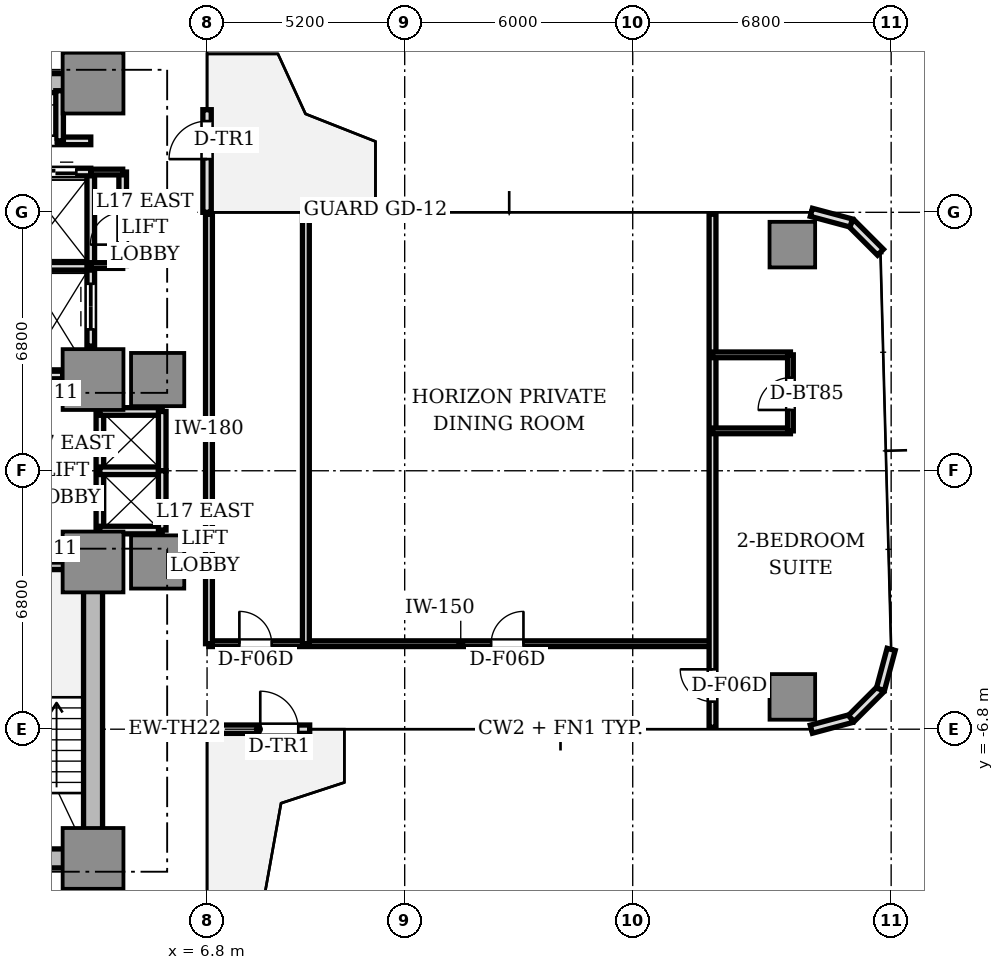
"""IFC4 building model, lengths in metres.
Left out: names, types, materials, properties, quantities, classifications, styles, units other than length and angle.
Written with IfcOpenShell. Run it as: python <this file> out.ifc"""

import sys

from ifc_helpers import new_model, si_unit, direction, frame, frame_2d, origin, origin_2d, place, context, subcontext, project, spatial, rectangle, extrude, source, transform, mapped, element, fill, save


model = new_model("IFC4")
c1 = context("Model", 3, precision=1e-05, world=origin(), true_north=direction((0.0, 1.0)))
c2 = subcontext(c1, "Body", "Model", "MODEL_VIEW")
j1 = project(units=[si_unit("LENGTHUNIT", "METRE"), si_unit("PLANEANGLEUNIT", "RADIAN")], contexts=[c1])
p1 = place(None, origin())
s1 = spatial("IfcSite", under=j1, at=p1, CompositionType="ELEMENT")
p2 = place(p1, origin())
s2 = spatial("IfcBuilding", under=s1, at=p2, CompositionType="ELEMENT")
p3 = place(p2, frame((0.0, 0.0, 64.45)))
s3 = spatial("IfcBuildingStorey", under=s2, at=p3, CompositionType="ELEMENT", Elevation=64.45)
for number, where, z_axis, x_axis in (
    (1, (-3.55, 10.2, 0.0), (0.0, 0.0, 1.0), (1.0, 0.0, 0.0)),
    (2, (-3.55, -10.2, 0.0), (0.0, 0.0, 1.0), (1.0, 0.0, 0.0)),
):
    element("IfcWall", number, at=place(p3, frame(where, z_axis=z_axis, x_axis=x_axis)), inside=s3, PredefinedType="SHEAR", context=c2, shape_type="SweptSolid", body=[
        extrude(rectangle(XDim=7.1, YDim=0.5, at=frame_2d((3.55, 0.0))), origin(), (0.0, 0.0, 1.0), 3.11),
    ])
p4 = place(p3, frame((3.8, -9.75, 0.0), z_axis=(0.0, 0.0, 1.0), x_axis=(0.0, 1.0, 0.0)))
e3 = element("IfcWall", 3, at=p4, inside=s3, PredefinedType="SHEAR", context=c2, shape_type="SweptSolid", body=[
    extrude(rectangle(XDim=6.9, YDim=0.5, at=frame_2d((3.45, 0.0))), origin(), (0.0, 0.0, 1.0), 3.11),
])
m1 = source(origin(), c2, "Body", "SweptSolid", [
    extrude(rectangle(XDim=1.6, YDim=1.6, at=origin_2d()), origin(), (0.0, 0.0, 1.0), 3.11),
])
for number, where, z_axis, x_axis in (
    (4, (3.8, 2.4, 0.0), (0.0, 0.0, 1.0), (1.0, 0.0, 0.0)),
    (5, (3.8, 10.2, 0.0), (0.0, 0.0, 1.0), (1.0, 0.0, 0.0)),
    (6, (3.8, -2.4, 0.0), (0.0, 0.0, 1.0), (1.0, 0.0, 0.0)),
    (7, (3.8, -10.2, 0.0), (0.0, 0.0, 1.0), (1.0, 0.0, 0.0)),
):
    element("IfcColumn", number, at=place(p3, frame(where, z_axis=z_axis, x_axis=x_axis)), inside=s3, PredefinedType="COLUMN", context=c2, shape_type="MappedRepresentation", body=[
        mapped(m1, transform((0.0, 0.0, 0.0), scale=1.0)),
    ])
m2 = source(origin(), c2, "Body", "SweptSolid", [
    extrude(rectangle(XDim=1.4, YDim=1.4, at=origin_2d()), origin(), (0.0, 0.0, 1.0), 3.11),
])
for number, where, z_axis, x_axis in (
    (8, (5.5, 2.4, 0.0), (0.0, 0.0, 1.0), (1.0, 0.0, 0.0)),
    (9, (5.5, -2.4, 0.0), (0.0, 0.0, 1.0), (1.0, 0.0, 0.0)),
):
    element("IfcColumn", number, at=place(p3, frame(where, z_axis=z_axis, x_axis=x_axis)), inside=s3, PredefinedType="COLUMN", context=c2, shape_type="MappedRepresentation", body=[
        mapped(m2, transform((0.0, 0.0, 0.0), scale=1.0)),
    ])
m3 = source(origin(), c2, "Body", "SweptSolid", [
    extrude(rectangle(XDim=1.2, YDim=1.2, at=origin_2d()), origin(), (0.0, 0.0, 1.0), 3.11),
])
for number, where, z_axis, x_axis in (
    (10, (22.2, -5.95, 0.0), (0.0, 0.0, 1.0), (1.0, 0.0, 0.0)),
    (11, (22.2, 5.95, 0.0), (0.0, 0.0, 1.0), (1.0, 0.0, 0.0)),
):
    element("IfcColumn", number, at=place(p3, frame(where, z_axis=z_axis, x_axis=x_axis)), inside=s3, PredefinedType="COLUMN", context=c2, shape_type="MappedRepresentation", body=[
        mapped(m3, transform((0.0, 0.0, 0.0), scale=1.0)),
    ])
p5 = place(p3, frame((6.8, -6.8, 0.0), z_axis=(0.0, 0.0, 1.0), x_axis=(1.0, 0.0, 0.0)))
e12 = element("IfcWall", 12, at=p5, inside=s3, PredefinedType="STANDARD", context=c2, shape_type="SweptSolid", body=[
    extrude(rectangle(XDim=2.7, YDim=0.22, at=frame_2d((1.35, 0.0))), origin(), (0.0, 0.0, 1.0), 3.11),
])
p6 = place(p5, frame((1.4, 0.0, 0.0)))
e13 = element("IfcOpeningElement", 13, at=p6, cuts=e12, PredefinedType="OPENING", context=c2, shape_type="SweptSolid", body=[
    extrude(rectangle(XDim=1.0, YDim=2.2, at=frame_2d((0.5, 1.1))), frame((0.0, 0.12, 0.0), z_axis=(0.0, -1.0, 0.0), x_axis=(1.0, 0.0, 0.0)), (0.0, 0.0, 1.0), 0.24),
])
for number, where, z_axis, x_axis in (
    (14, (22.7, -6.8, 0.0), (0.0, 0.0, 1.0), (0.966, 0.259, 0.0)),
    (15, (23.75, -6.519, 0.0), (0.0, 0.0, 1.0), (0.707, 0.707, 0.0)),
    (16, (24.519, -5.75, 0.0), (0.0, 0.0, 1.0), (0.259, 0.966, 0.0)),
    (17, (24.519, 5.75, 0.0), (0.0, 0.0, 1.0), (-0.707, 0.707, 0.0)),
    (18, (23.75, 6.519, 0.0), (0.0, 0.0, 1.0), (-0.966, 0.259, 0.0)),
):
    element("IfcWall", number, at=place(p3, frame(where, z_axis=z_axis, x_axis=x_axis)), inside=s3, PredefinedType="STANDARD", context=c2, shape_type="SweptSolid", body=[
        extrude(rectangle(XDim=1.087, YDim=0.22, at=frame_2d((0.543, 0.0))), origin(), (0.0, 0.0, 1.0), 3.11),
    ])
p7 = place(p3, frame((6.8, 6.8, 0.0), z_axis=(0.0, 0.0, 1.0), x_axis=(0.0, 1.0, 0.0)))
e19 = element("IfcWall", 19, at=p7, inside=s3, PredefinedType="STANDARD", context=c2, shape_type="SweptSolid", body=[
    extrude(rectangle(XDim=2.7, YDim=0.22, at=frame_2d((1.35, 0.0))), origin(), (0.0, 0.0, 1.0), 3.11),
])
p8 = place(p7, frame((1.4, 0.0, 0.0)))
e20 = element("IfcOpeningElement", 20, at=p8, cuts=e19, PredefinedType="OPENING", context=c2, shape_type="SweptSolid", body=[
    extrude(rectangle(XDim=1.0, YDim=2.2, at=frame_2d((0.5, 1.1))), frame((0.0, 0.12, 0.0), z_axis=(0.0, -1.0, 0.0), x_axis=(1.0, 0.0, 0.0)), (0.0, 0.0, 1.0), 0.24),
])
p9 = place(p3, frame((0.0, -2.5, 0.0), z_axis=(0.0, 0.0, 1.0), x_axis=(1.0, 0.0, 0.0)))
e21 = element("IfcWall", 21, at=p9, inside=s3, PredefinedType="SOLIDWALL", context=c2, shape_type="SweptSolid", body=[
    extrude(rectangle(XDim=3.72, YDim=0.2, at=frame_2d((1.86, 0.0))), origin(), (0.0, 0.0, 1.0), 3.11),
])
p10 = place(p3, frame((2.0, 2.52, 0.0), z_axis=(0.0, 0.0, 1.0), x_axis=(1.0, 0.0, 0.0)))
e22 = element("IfcWall", 22, at=p10, inside=s3, PredefinedType="SOLIDWALL", context=c2, shape_type="SweptSolid", body=[
    extrude(rectangle(XDim=1.0, YDim=0.2, at=frame_2d((0.5, 0.0))), origin(), (0.0, 0.0, 1.0), 2.66),
])
p11 = place(p3, frame((3.74, 3.28, 0.0), z_axis=(0.0, 0.0, 1.0), x_axis=(0.0, 1.0, 0.0)))
e23 = element("IfcWall", 23, at=p11, inside=s3, PredefinedType="SOLIDWALL", context=c2, shape_type="SweptSolid", body=[
    extrude(rectangle(XDim=2.08, YDim=0.2, at=frame_2d((1.04, 0.0))), origin(), (0.0, 0.0, 1.0), 2.66),
])
p12 = place(p11, frame((0.44, 0.0, 0.0)))
e24 = element("IfcOpeningElement", 24, at=p12, cuts=e23, PredefinedType="OPENING", context=c2, shape_type="SweptSolid", body=[
    extrude(rectangle(XDim=1.2, YDim=2.2, at=frame_2d((0.6, 1.1))), frame((0.0, 0.11, 0.0), z_axis=(0.0, -1.0, 0.0), x_axis=(1.0, 0.0, 0.0)), (0.0, 0.0, 1.0), 0.22),
])
p13 = place(p3, frame((0.05, 5.38, 0.0), z_axis=(0.0, 0.0, 1.0), x_axis=(1.0, 0.0, 0.0)))
e25 = element("IfcWall", 25, at=p13, inside=s3, PredefinedType="SOLIDWALL", context=c2, shape_type="SweptSolid", body=[
    extrude(rectangle(XDim=3.69, YDim=0.2, at=frame_2d((1.845, 0.0))), origin(), (0.0, 0.0, 1.0), 2.66),
])
p14 = place(p3, frame((3.74, 5.38, 0.0), z_axis=(0.0, 0.0, 1.0), x_axis=(0.0, 1.0, 0.0)))
e26 = element("IfcWall", 26, at=p14, inside=s3, PredefinedType="SOLIDWALL", context=c2, shape_type="SweptSolid", body=[
    extrude(rectangle(XDim=2.48, YDim=0.2, at=frame_2d((1.24, 0.0))), origin(), (0.0, 0.0, 1.0), 2.66),
])
p15 = place(p3, frame((1.9, 7.86, 0.0), z_axis=(0.0, 0.0, 1.0), x_axis=(1.0, 0.0, 0.0)))
e27 = element("IfcWall", 27, at=p15, inside=s3, PredefinedType="SOLIDWALL", context=c2, shape_type="SweptSolid", body=[
    extrude(rectangle(XDim=1.84, YDim=0.2, at=frame_2d((0.92, 0.0))), origin(), (0.0, 0.0, 1.0), 2.66),
])
p16 = place(p15, frame((0.36, 0.0, 0.0)))
e28 = element("IfcOpeningElement", 28, at=p16, cuts=e27, PredefinedType="OPENING", context=c2, shape_type="SweptSolid", body=[
    extrude(rectangle(XDim=1.1, YDim=2.2, at=frame_2d((0.55, 1.1))), frame((0.0, 0.11, 0.0), z_axis=(0.0, -1.0, 0.0), x_axis=(1.0, 0.0, 0.0)), (0.0, 0.0, 1.0), 0.22),
])
p17 = place(p3, frame((3.98, -1.56, 0.0), z_axis=(0.0, 0.0, 1.0), x_axis=(0.0, 1.0, 0.0)))
e29 = element("IfcWall", 29, at=p17, inside=s3, PredefinedType="SOLIDWALL", context=c2, shape_type="SweptSolid", body=[
    extrude(rectangle(XDim=3.12, YDim=0.2, at=frame_2d((1.56, 0.0))), origin(), (0.0, 0.0, 1.0), 2.18),
])
for number, where, z_axis, x_axis in (
    (30, (3.98, 1.56, 0.0), (0.0, 0.0, 1.0), (1.0, 0.0, 0.0)),
    (31, (3.98, -1.56, 0.0), (0.0, 0.0, 1.0), (1.0, 0.0, 0.0)),
    (32, (3.98, 0.0, 0.0), (0.0, 0.0, 1.0), (1.0, 0.0, 0.0)),
):
    element("IfcWall", number, at=place(p3, frame(where, z_axis=z_axis, x_axis=x_axis)), inside=s3, PredefinedType="SOLIDWALL", context=c2, shape_type="SweptSolid", body=[
        extrude(rectangle(XDim=1.64, YDim=0.2, at=frame_2d((0.82, 0.0))), origin(), (0.0, 0.0, 1.0), 2.66),
    ])
for number, where, z_axis, x_axis in (
    (33, (5.62, 0.0, 0.0), (0.0, 0.0, 1.0), (0.0, 1.0, 0.0)),
    (34, (5.62, -1.56, 0.0), (0.0, 0.0, 1.0), (0.0, 1.0, 0.0)),
):
    element("IfcWall", number, at=place(p3, frame(where, z_axis=z_axis, x_axis=x_axis)), inside=s3, PredefinedType="SOLIDWALL", context=c2, shape_type="SweptSolid", body=[
        extrude(rectangle(XDim=1.56, YDim=0.2, at=frame_2d((0.78, 0.0))), origin(), (0.0, 0.0, 1.0), 2.66),
    ])
p18 = place(p3, frame((0.12, 8.68, 0.0), z_axis=(0.0, 0.0, 1.0), x_axis=(1.0, 0.0, 0.0)))
e35 = element("IfcWall", 35, at=p18, inside=s3, PredefinedType="SOLIDWALL", context=c2, shape_type="SweptSolid", body=[
    extrude(rectangle(XDim=3.62, YDim=0.2, at=frame_2d((1.81, 0.0))), origin(), (0.0, 0.0, 1.0), 2.66),
])
p19 = place(p18, frame((1.75, 0.0, 0.0)))
e36 = element("IfcOpeningElement", 36, at=p19, cuts=e35, PredefinedType="OPENING", context=c2, shape_type="SweptSolid", body=[
    extrude(rectangle(XDim=0.95, YDim=2.15, at=frame_2d((0.475, 1.075))), frame((0.0, 0.11, 0.0), z_axis=(0.0, -1.0, 0.0), x_axis=(1.0, 0.0, 0.0)), (0.0, 0.0, 1.0), 0.22),
])
p20 = place(p3, frame((2.92, 8.68, 0.0), z_axis=(0.0, 0.0, 1.0), x_axis=(0.0, 1.0, 0.0)))
e37 = element("IfcWall", 37, at=p20, inside=s3, PredefinedType="SOLIDWALL", context=c2, shape_type="SweptSolid", body=[
    extrude(rectangle(XDim=1.32, YDim=0.2, at=frame_2d((0.66, 0.0))), origin(), (0.0, 0.0, 1.0), 2.66),
])
p21 = place(p3, frame((4.58, 5.4, 0.0), z_axis=(0.0, 0.0, 1.0), x_axis=(0.0, 1.0, 0.0)))
e38 = element("IfcWall", 38, at=p21, inside=s3, PredefinedType="SOLIDWALL", context=c2, shape_type="SweptSolid", body=[
    extrude(rectangle(XDim=2.46, YDim=0.2, at=frame_2d((1.23, 0.0))), origin(), (0.0, 0.0, 1.0), 2.66),
])
p22 = place(p21, frame((0.55, 0.0, 0.0)))
e39 = element("IfcOpeningElement", 39, at=p22, cuts=e38, PredefinedType="OPENING", context=c2, shape_type="SweptSolid", body=[
    extrude(rectangle(XDim=0.85, YDim=2.1, at=frame_2d((0.425, 1.05))), frame((0.0, 0.11, 0.0), z_axis=(0.0, -1.0, 0.0), x_axis=(1.0, 0.0, 0.0)), (0.0, 0.0, 1.0), 0.22),
])
for number, where, z_axis, x_axis in (
    (40, (3.74, 5.4, 0.0), (0.0, 0.0, 1.0), (1.0, 0.0, 0.0)),
    (41, (3.74, 7.86, 0.0), (0.0, 0.0, 1.0), (1.0, 0.0, 0.0)),
):
    element("IfcWall", number, at=place(p3, frame(where, z_axis=z_axis, x_axis=x_axis)), inside=s3, PredefinedType="PARTITIONING", context=c2, shape_type="SweptSolid", body=[
        extrude(rectangle(XDim=0.84, YDim=0.15, at=frame_2d((0.42, 0.0))), origin(), (0.0, 0.0, 1.0), 2.66),
    ])
p23 = place(p3, frame((6.85, -4.55, 0.0), z_axis=(0.0, 0.0, 1.0), x_axis=(1.0, 0.0, 0.0)))
e42 = element("IfcWall", 42, at=p23, inside=s3, PredefinedType="PARTITIONING", context=c2, shape_type="SweptSolid", body=[
    extrude(rectangle(XDim=13.25, YDim=0.15, at=frame_2d((6.625, 0.0))), origin(), (0.0, 0.0, 1.0), 2.63),
])
p24 = place(p23, frame((0.8, 0.0, 0.0)))
e43 = element("IfcOpeningElement", 43, at=p24, cuts=e42, PredefinedType="OPENING", context=c2, shape_type="SweptSolid", body=[
    extrude(rectangle(XDim=0.85, YDim=2.1, at=frame_2d((0.425, 1.05))), frame((0.0, 0.085, 0.0), z_axis=(0.0, -1.0, 0.0), x_axis=(1.0, 0.0, 0.0)), (0.0, 0.0, 1.0), 0.17),
])
p25 = place(p23, frame((7.425, 0.0, 0.0)))
e44 = element("IfcOpeningElement", 44, at=p25, cuts=e42, PredefinedType="OPENING", context=c2, shape_type="SweptSolid", body=[
    extrude(rectangle(XDim=0.85, YDim=2.1, at=frame_2d((0.425, 1.05))), frame((0.0, 0.085, 0.0), z_axis=(0.0, -1.0, 0.0), x_axis=(1.0, 0.0, 0.0)), (0.0, 0.0, 1.0), 0.17),
])
for number, where, z_axis, x_axis in (
    (45, (6.85, -4.55, 0.0), (0.0, 0.0, 1.0), (0.0, 1.0, 0.0)),
    (46, (9.4, -4.55, 0.0), (0.0, 0.0, 1.0), (0.0, 1.0, 0.0)),
):
    element("IfcWall", number, at=place(p3, frame(where, z_axis=z_axis, x_axis=x_axis)), inside=s3, PredefinedType="PARTITIONING", context=c2, shape_type="SweptSolid", body=[
        extrude(rectangle(XDim=11.3, YDim=0.18, at=frame_2d((5.65, 0.0))), origin(), (0.0, 0.0, 1.0), 2.66),
    ])
p26 = place(p3, frame((20.1, -6.75, 0.0), z_axis=(0.0, 0.0, 1.0), x_axis=(0.0, 1.0, 0.0)))
e47 = element("IfcWall", 47, at=p26, inside=s3, PredefinedType="PARTITIONING", context=c2, shape_type="SweptSolid", body=[
    extrude(rectangle(XDim=13.5, YDim=0.18, at=frame_2d((6.75, 0.0))), origin(), (0.0, 0.0, 1.0), 2.66),
])
p27 = place(p26, frame((0.675, 0.0, 0.0)))
e48 = element("IfcOpeningElement", 48, at=p27, cuts=e47, PredefinedType="OPENING", context=c2, shape_type="SweptSolid", body=[
    extrude(rectangle(XDim=0.85, YDim=2.1, at=frame_2d((0.425, 1.05))), frame((0.0, 0.1, 0.0), z_axis=(0.0, -1.0, 0.0), x_axis=(1.0, 0.0, 0.0)), (0.0, 0.0, 1.0), 0.2),
])
p28 = place(p3, frame((20.1, 3.05, 0.0), z_axis=(0.0, 0.0, 1.0), x_axis=(1.0, 0.0, 0.0)))
e49 = element("IfcWall", 49, at=p28, inside=s3, PredefinedType="PARTITIONING", context=c2, shape_type="SweptSolid", body=[
    extrude(rectangle(XDim=2.05, YDim=0.15, at=frame_2d((1.025, 0.0))), origin(), (0.0, 0.0, 1.0), 2.63),
])
p29 = place(p3, frame((20.1, 1.05, 0.0), z_axis=(0.0, 0.0, 1.0), x_axis=(1.0, 0.0, 0.0)))
e50 = element("IfcWall", 50, at=p29, inside=s3, PredefinedType="PARTITIONING", context=c2, shape_type="SweptSolid", body=[
    extrude(rectangle(XDim=2.05, YDim=0.15, at=frame_2d((1.025, 0.0))), origin(), (0.0, 0.0, 1.0), 2.66),
])
p30 = place(p3, frame((22.15, 1.05, 0.0), z_axis=(0.0, 0.0, 1.0), x_axis=(0.0, 1.0, 0.0)))
e51 = element("IfcWall", 51, at=p30, inside=s3, PredefinedType="PARTITIONING", context=c2, shape_type="SweptSolid", body=[
    extrude(rectangle(XDim=2.0, YDim=0.15, at=frame_2d((1.0, 0.0))), origin(), (0.0, 0.0, 1.0), 2.58),
])
p31 = place(p30, frame((0.55, 0.0, 0.0)))
e52 = element("IfcOpeningElement", 52, at=p31, cuts=e51, PredefinedType="OPENING", context=c2, shape_type="SweptSolid", body=[
    extrude(rectangle(XDim=0.85, YDim=2.1, at=frame_2d((0.425, 1.05))), frame((0.0, 0.085, 0.0), z_axis=(0.0, -1.0, 0.0), x_axis=(1.0, 0.0, 0.0)), (0.0, 0.0, 1.0), 0.17),
])
m4 = source(origin(), c2, "Body", "SweptSolid", [
    extrude(rectangle(XDim=1.0, YDim=0.05, at=origin_2d()), origin(), (0.0, 0.0, 1.0), 2.2),
])
p32 = place(p6, frame((0.5, 0.0, 0.0)))
e53 = element("IfcDoor", 53, at=p32, inside=s3, OperationType="SINGLE_SWING_LEFT", PredefinedType="DOOR", context=c2, shape_type="MappedRepresentation", body=[
    mapped(m4, transform((0.0, 0.0, 0.0), scale=1.0)),
])
fill(e13, e53)
p33 = place(p8, frame((0.5, 0.0, 0.0)))
e54 = element("IfcDoor", 54, at=p33, inside=s3, OperationType="SINGLE_SWING_LEFT", PredefinedType="DOOR", context=c2, shape_type="MappedRepresentation", body=[
    mapped(m4, transform((0.0, 0.0, 0.0), scale=1.0)),
])
fill(e20, e54)
m5 = source(origin(), c2, "Body", "SweptSolid", [
    extrude(rectangle(XDim=1.2, YDim=0.05, at=origin_2d()), origin(), (0.0, 0.0, 1.0), 2.2),
])
p34 = place(p12, frame((0.6, 0.0, 0.0)))
e55 = element("IfcDoor", 55, at=p34, inside=s3, OperationType="DOUBLE_DOOR_SLIDING", PredefinedType="DOOR", context=c2, shape_type="MappedRepresentation", body=[
    mapped(m5, transform((0.0, 0.0, 0.0), scale=1.0)),
])
fill(e24, e55)
m6 = source(origin(), c2, "Body", "SweptSolid", [
    extrude(rectangle(XDim=1.1, YDim=0.05, at=origin_2d()), origin(), (0.0, 0.0, 1.0), 2.2),
])
p35 = place(p16, frame((0.55, 0.0, 0.0)))
e56 = element("IfcDoor", 56, at=p35, inside=s3, OperationType="DOUBLE_DOOR_SLIDING", PredefinedType="DOOR", context=c2, shape_type="MappedRepresentation", body=[
    mapped(m6, transform((0.0, 0.0, 0.0), scale=1.0)),
])
fill(e28, e56)
m7 = source(origin(), c2, "Body", "SweptSolid", [
    extrude(rectangle(XDim=0.95, YDim=0.05, at=origin_2d()), origin(), (0.0, 0.0, 1.0), 2.15),
])
p36 = place(p19, frame((0.475, 0.0, 0.0)))
e57 = element("IfcDoor", 57, at=p36, inside=s3, OperationType="SINGLE_SWING_RIGHT", PredefinedType="DOOR", context=c2, shape_type="MappedRepresentation", body=[
    mapped(m7, transform((0.0, 0.0, 0.0), scale=1.0)),
])
fill(e36, e57)
m8 = source(origin(), c2, "Body", "SweptSolid", [
    extrude(rectangle(XDim=0.85, YDim=0.05, at=origin_2d()), origin(), (0.0, 0.0, 1.0), 2.1),
])
p37 = place(p22, frame((0.425, 0.0, 0.0)))
e58 = element("IfcDoor", 58, at=p37, inside=s3, OperationType="SINGLE_SWING_LEFT", PredefinedType="DOOR", context=c2, shape_type="MappedRepresentation", body=[
    mapped(m8, transform((0.0, 0.0, 0.0), scale=1.0)),
])
fill(e39, e58)
p38 = place(p24, frame((0.425, 0.0, 0.0)))
e59 = element("IfcDoor", 59, at=p38, inside=s3, OperationType="SINGLE_SWING_LEFT", PredefinedType="DOOR", context=c2, shape_type="MappedRepresentation", body=[
    mapped(m8, transform((0.0, 0.0, 0.0), scale=1.0)),
])
fill(e43, e59)
p39 = place(p25, frame((0.425, 0.0, 0.0)))
e60 = element("IfcDoor", 60, at=p39, inside=s3, OperationType="SINGLE_SWING_RIGHT", PredefinedType="DOOR", context=c2, shape_type="MappedRepresentation", body=[
    mapped(m8, transform((0.0, 0.0, 0.0), scale=1.0)),
])
fill(e44, e60)
p40 = place(p31, frame((0.425, 0.0, 0.0)))
e61 = element("IfcDoor", 61, at=p40, inside=s3, OperationType="SINGLE_SWING_LEFT", PredefinedType="DOOR", context=c2, shape_type="MappedRepresentation", body=[
    mapped(m8, transform((0.0, 0.0, 0.0), scale=1.0)),
])
fill(e52, e61)
p41 = place(p27, frame((0.425, 0.0, 0.0)))
e62 = element("IfcDoor", 62, at=p41, inside=s3, OperationType="SINGLE_SWING_RIGHT", PredefinedType="DOOR", context=c2, shape_type="MappedRepresentation", body=[
    mapped(m8, transform((0.0, 0.0, 0.0), scale=1.0)),
])
fill(e48, e62)
save(model, sys.argv[1])
